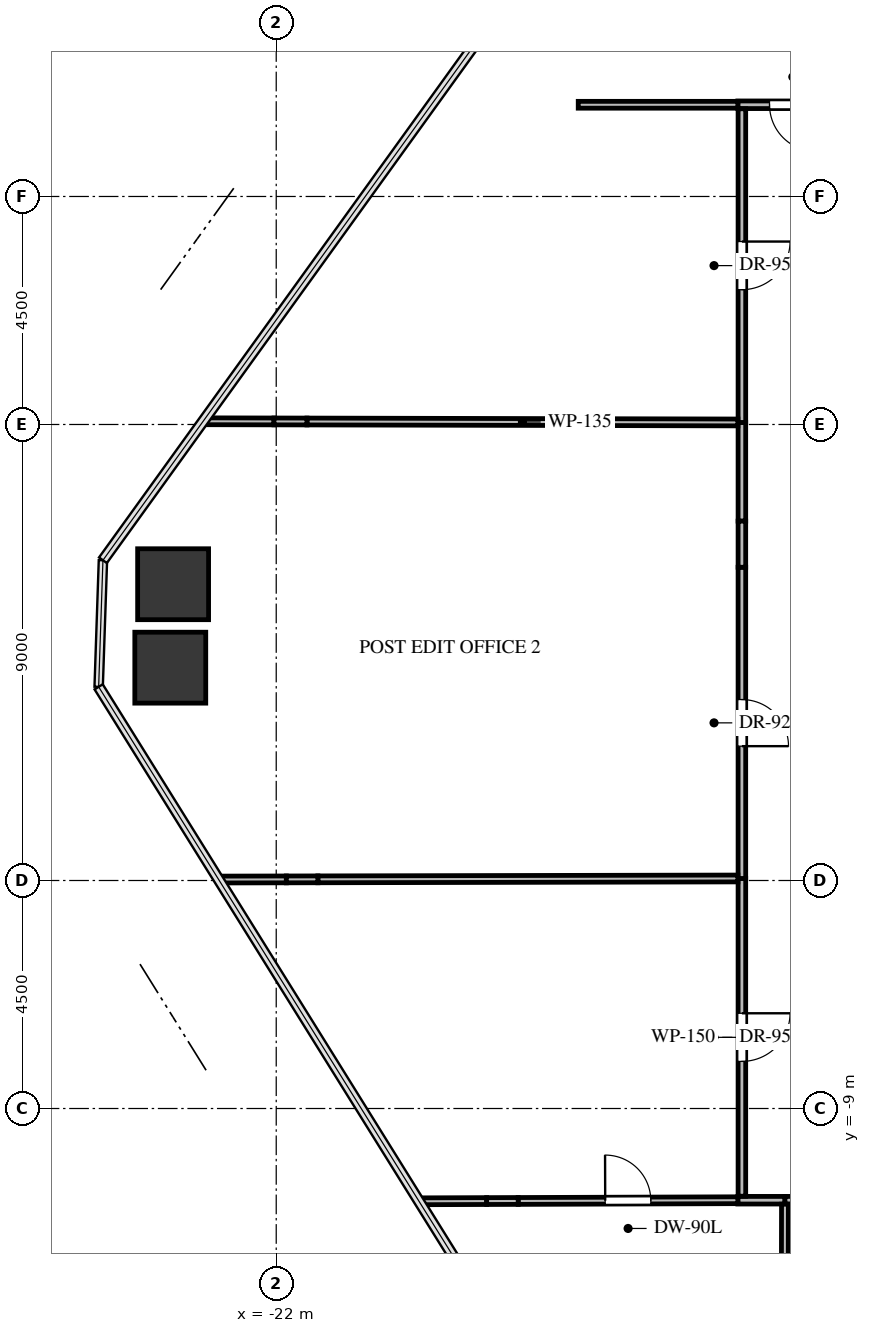
"""IFC4 building model, lengths in metres.
Left out: names, types, materials, properties, quantities, classifications, styles, units other than length and angle.
Written with IfcOpenShell. Run it as: python <this file> out.ifc"""

import sys

from ifc_helpers import new_model, si_unit, direction, frame, frame_2d, origin, origin_2d, place, context, subcontext, project, spatial, rectangle, extrude, source, transform, mapped, element, fill, save


model = new_model("IFC4")
c1 = context("Model", 3, precision=1e-05, world=origin(), true_north=direction((0.0, 1.0)))
c2 = subcontext(c1, "Body", "Model", "MODEL_VIEW")
j1 = project(units=[si_unit("LENGTHUNIT", "METRE"), si_unit("PLANEANGLEUNIT", "RADIAN")], contexts=[c1])
p1 = place(None, origin())
s1 = spatial("IfcSite", under=j1, at=p1, CompositionType="ELEMENT")
p2 = place(p1, origin())
s2 = spatial("IfcBuilding", under=s1, at=p2, CompositionType="ELEMENT")
p3 = place(p2, frame((0.0, 0.0, 78.3)))
s3 = spatial("IfcBuildingStorey", under=s2, at=p3, CompositionType="ELEMENT", Elevation=78.3)
m1 = source(origin(), c2, "Body", "SweptSolid", [
    extrude(rectangle(XDim=1.4, YDim=1.4, at=origin_2d()), origin(), (0.0, 0.0, 1.0), 3.0),
])
for number, where, z_axis, x_axis in (
    (1, (-24.091, -0.3, -0.24), (0.0, 0.0, 1.0), (1.0, 0.0, 0.0)),
    (2, (-24.035, 1.347, -0.24), (0.0, 0.0, 1.0), (1.0, 0.0, 0.0)),
):
    element("IfcColumn", number, at=place(p3, frame(where, z_axis=z_axis, x_axis=x_axis)), inside=s3, PredefinedType="COLUMN", context=c2, shape_type="MappedRepresentation", body=[
        mapped(m1, transform((0.0, 0.0, 0.0), x_axis=(1.0, 0.0, 0.0), y_axis=(0.0, 1.0, 0.0), z_axis=(0.0, 0.0, 1.0), scale=1.0)),
    ])
p4 = place(p3, frame((-10.72, 10.81, 0.0), z_axis=(0.0, 0.0, 1.0), x_axis=(-1.0, 0.0, 0.0)))
e3 = element("IfcWall", 3, at=p4, inside=s3, PredefinedType="PARTITIONING", context=c2, shape_type="SweptSolid", body=[
    extrude(rectangle(XDim=2.17, YDim=0.15, at=frame_2d((1.085, 0.0))), origin(), (0.0, 0.0, 1.0), 2.745),
])
p5 = place(p4, frame((0.625, 0.0, 0.0)))
e4 = element("IfcOpeningElement", 4, at=p5, cuts=e3, PredefinedType="OPENING", context=c2, shape_type="SweptSolid", body=[
    extrude(rectangle(XDim=0.92, YDim=2.1, at=frame_2d((0.46, 1.05))), frame((0.0, 0.085, 0.0), z_axis=(0.0, -1.0, 0.0), x_axis=(1.0, 0.0, 0.0)), (0.0, 0.0, 1.0), 0.17),
])
p6 = place(p3, frame((-12.89, -10.81, 0.0), z_axis=(0.0, 0.0, 1.0), x_axis=(1.0, 0.0, 0.0)))
e5 = element("IfcWall", 5, at=p6, inside=s3, PredefinedType="PARTITIONING", context=c2, shape_type="SweptSolid", body=[
    extrude(rectangle(XDim=0.93, YDim=0.15, at=frame_2d((0.465, 0.0))), origin(), (0.0, 0.0, 1.0), 2.745),
])
p7 = place(p3, frame((-11.96, -10.81, 0.0), z_axis=(0.0, 0.0, 1.0), x_axis=(1.0, 0.0, 0.0)))
e6 = element("IfcWall", 6, at=p7, inside=s3, PredefinedType="PARTITIONING", context=c2, shape_type="SweptSolid", body=[
    extrude(rectangle(XDim=5.838, YDim=0.15, at=frame_2d((2.919, 0.0))), origin(), (0.0, 0.0, 1.0), 1.83),
])
p8 = place(p3, frame((-12.81, -4.46, 0.0), z_axis=(0.0, 0.0, 1.0), x_axis=(0.0, -1.0, 0.0)))
e7 = element("IfcWall", 7, at=p8, inside=s3, PredefinedType="PARTITIONING", context=c2, shape_type="SweptSolid", body=[
    extrude(rectangle(XDim=6.271, YDim=0.15, at=frame_2d((3.135, 0.0))), origin(), (0.0, 0.0, 1.0), 2.745),
])
p9 = place(p8, frame((2.66, 0.0, 0.0)))
e8 = element("IfcOpeningElement", 8, at=p9, cuts=e7, PredefinedType="OPENING", context=c2, shape_type="SweptSolid", body=[
    extrude(rectangle(XDim=0.95, YDim=2.1, at=frame_2d((0.475, 1.05))), frame((0.0, 0.085, 0.0), z_axis=(0.0, -1.0, 0.0), x_axis=(1.0, 0.0, 0.0)), (0.0, 0.0, 1.0), 0.17),
])
p10 = place(p3, frame((-12.81, 4.54, 0.0), z_axis=(0.0, 0.0, 1.0), x_axis=(0.0, -1.0, 0.0)))
e9 = element("IfcWall", 9, at=p10, inside=s3, PredefinedType="PARTITIONING", context=c2, shape_type="SweptSolid", body=[
    extrude(rectangle(XDim=1.948, YDim=0.15, at=frame_2d((0.974, 0.0))), origin(), (0.0, 0.0, 1.0), 2.745),
])
p11 = place(p3, frame((-12.81, 1.682, 0.0), z_axis=(0.0, 0.0, 1.0), x_axis=(0.0, -1.0, 0.0)))
e10 = element("IfcWall", 10, at=p11, inside=s3, PredefinedType="PARTITIONING", context=c2, shape_type="SweptSolid", body=[
    extrude(rectangle(XDim=6.142, YDim=0.15, at=frame_2d((3.071, 0.0))), origin(), (0.0, 0.0, 1.0), 2.745),
])
p12 = place(p11, frame((2.611, 0.0, 0.0)))
e11 = element("IfcOpeningElement", 11, at=p12, cuts=e10, PredefinedType="OPENING", context=c2, shape_type="SweptSolid", body=[
    extrude(rectangle(XDim=0.92, YDim=2.1, at=frame_2d((0.46, 1.05))), frame((0.0, 0.085, 0.0), z_axis=(0.0, -1.0, 0.0), x_axis=(1.0, 0.0, 0.0)), (0.0, 0.0, 1.0), 0.17),
])
p13 = place(p3, frame((-12.81, 2.592, 0.0), z_axis=(0.0, 0.0, 1.0), x_axis=(0.0, -1.0, 0.0)))
e12 = element("IfcWall", 12, at=p13, inside=s3, PredefinedType="PARTITIONING", context=c2, shape_type="SweptSolid", body=[
    extrude(rectangle(XDim=0.91, YDim=0.15, at=frame_2d((0.455, 0.0))), origin(), (0.0, 0.0, 1.0), 1.83),
])
p14 = place(p3, frame((-12.81, 10.731, 0.0), z_axis=(0.0, 0.0, 1.0), x_axis=(0.0, -1.0, 0.0)))
e13 = element("IfcWall", 13, at=p14, inside=s3, PredefinedType="PARTITIONING", context=c2, shape_type="SweptSolid", body=[
    extrude(rectangle(XDim=6.191, YDim=0.15, at=frame_2d((3.095, 0.0))), origin(), (0.0, 0.0, 1.0), 2.745),
])
p15 = place(p14, frame((2.621, 0.0, 0.0)))
e14 = element("IfcOpeningElement", 14, at=p15, cuts=e13, PredefinedType="OPENING", context=c2, shape_type="SweptSolid", body=[
    extrude(rectangle(XDim=0.95, YDim=2.1, at=frame_2d((0.475, 1.05))), frame((0.0, 0.085, 0.0), z_axis=(0.0, -1.0, 0.0), x_axis=(1.0, 0.0, 0.0)), (0.0, 0.0, 1.0), 0.17),
])
p16 = place(p3, frame((-12.89, 10.81, 0.0), z_axis=(0.0, 0.0, 1.0), x_axis=(-1.0, 0.0, 0.0)))
e15 = element("IfcWall", 15, at=p16, inside=s3, PredefinedType="PARTITIONING", context=c2, shape_type="SweptSolid", body=[
    extrude(rectangle(XDim=3.15, YDim=0.135, at=frame_2d((1.575, 0.0))), origin(), (0.0, 0.0, 1.0), 2.745),
])
p17 = place(p3, frame((-11.96, -10.889, 0.0), z_axis=(0.0, 0.0, 1.0), x_axis=(-0.002018838416, -0.999997962144, 0.0)))
e16 = element("IfcWall", 16, at=p17, inside=s3, PredefinedType="PARTITIONING", context=c2, shape_type="SweptSolid", body=[
    extrude(rectangle(XDim=5.805, YDim=0.135, at=frame_2d((2.902, 0.0))), origin(), (0.0, 0.0, 1.0), 1.83),
])
p18 = place(p3, frame((-19.182, -10.831, 0.0), z_axis=(0.0, 0.0, 1.0), x_axis=(0.999994579825, 0.00329246432, 0.0)))
e17 = element("IfcWall", 17, at=p18, inside=s3, PredefinedType="PARTITIONING", context=c2, shape_type="SweptSolid", body=[
    extrude(rectangle(XDim=1.335, YDim=0.135, at=frame_2d((0.667, 0.0))), origin(), (0.0, 0.0, 1.0), 2.745),
])
p19 = place(p3, frame((-17.225, -10.825, 0.0), z_axis=(0.0, 0.0, 1.0), x_axis=(0.999994480721, 0.003322427884, 0.0)))
e18 = element("IfcWall", 18, at=p19, inside=s3, PredefinedType="PARTITIONING", context=c2, shape_type="SweptSolid", body=[
    extrude(rectangle(XDim=4.335, YDim=0.135, at=frame_2d((2.168, 0.0))), origin(), (0.0, 0.0, 1.0), 2.745),
])
p20 = place(p19, frame((1.718, 0.0, 0.0)))
e19 = element("IfcOpeningElement", 19, at=p20, cuts=e18, PredefinedType="OPENING", context=c2, shape_type="SweptSolid", body=[
    extrude(rectangle(XDim=0.9, YDim=2.05, at=frame_2d((0.45, 1.025))), frame((0.0, 0.078, 0.0), z_axis=(0.0, -1.0, 0.0), x_axis=(1.0, 0.0, 0.0)), (0.0, 0.0, 1.0), 0.155),
])
p21 = place(p3, frame((-17.847, -10.827, 0.0), z_axis=(0.0, 0.0, 1.0), x_axis=(0.999993761903, 0.00353216007, 0.0)))
e20 = element("IfcWall", 20, at=p21, inside=s3, PredefinedType="PARTITIONING", context=c2, shape_type="SweptSolid", body=[
    extrude(rectangle(XDim=0.622, YDim=0.135, at=frame_2d((0.311, 0.0))), origin(), (0.0, 0.0, 1.0), 2.08),
])
p22 = place(p3, frame((-23.136, -4.481, 0.0), z_axis=(0.0, 0.0, 1.0), x_axis=(0.999997979486, 0.002010229856, 0.0)))
e21 = element("IfcWall", 21, at=p22, inside=s3, PredefinedType="PARTITIONING", context=c2, shape_type="SweptSolid", body=[
    extrude(rectangle(XDim=1.336, YDim=0.135, at=frame_2d((0.668, 0.0))), origin(), (0.0, 0.0, 1.0), 2.745),
])
p23 = place(p3, frame((-21.178, -4.477, 0.0), z_axis=(0.0, 0.0, 1.0), x_axis=(0.999997934924, 0.00203227667, 0.0)))
e22 = element("IfcWall", 22, at=p23, inside=s3, PredefinedType="PARTITIONING", context=c2, shape_type="SweptSolid", body=[
    extrude(rectangle(XDim=8.289, YDim=0.135, at=frame_2d((4.145, 0.0))), origin(), (0.0, 0.0, 1.0), 2.745),
])
p24 = place(p3, frame((-21.8, -4.479, 0.0), z_axis=(0.0, 0.0, 1.0), x_axis=(0.999997229673, 0.00235385774, 0.0)))
e23 = element("IfcWall", 23, at=p24, inside=s3, PredefinedType="PARTITIONING", context=c2, shape_type="SweptSolid", body=[
    extrude(rectangle(XDim=0.622, YDim=0.135, at=frame_2d((0.311, 0.0))), origin(), (0.0, 0.0, 1.0), 2.08),
])
p25 = place(p3, frame((-23.442, 4.563, 0.0), z_axis=(0.0, 0.0, 1.0), x_axis=(0.999997421875, -0.002270736504, 0.0)))
e24 = element("IfcWall", 24, at=p25, inside=s3, PredefinedType="PARTITIONING", context=c2, shape_type="SweptSolid", body=[
    extrude(rectangle(XDim=1.398, YDim=0.135, at=frame_2d((0.699, 0.0))), origin(), (0.0, 0.0, 1.0), 2.745),
])
p26 = place(p3, frame((-21.393, 4.559, 0.0), z_axis=(0.0, 0.0, 1.0), x_axis=(0.999997619934, -0.002181771233, 0.0)))
e25 = element("IfcWall", 25, at=p26, inside=s3, PredefinedType="PARTITIONING", context=c2, shape_type="SweptSolid", body=[
    extrude(rectangle(XDim=8.504, YDim=0.135, at=frame_2d((4.252, 0.0))), origin(), (0.0, 0.0, 1.0), 2.745),
])
p27 = place(p3, frame((-22.045, 4.56, 0.0), z_axis=(0.0, 0.0, 1.0), x_axis=(0.999997471289, -0.002248869875, 0.0)))
e26 = element("IfcWall", 26, at=p27, inside=s3, PredefinedType="PARTITIONING", context=c2, shape_type="SweptSolid", body=[
    extrude(rectangle(XDim=0.651, YDim=0.135, at=frame_2d((0.326, 0.0))), origin(), (0.0, 0.0, 1.0), 2.08),
])
m2 = source(origin(), c2, "Body", "SweptSolid", [
    extrude(rectangle(XDim=0.92, YDim=2.1, at=frame_2d((0.46, 1.05))), frame((0.0, 0.025, 0.0), z_axis=(0.0, -1.0, 0.0), x_axis=(1.0, 0.0, 0.0)), (0.0, 0.0, 1.0), 0.05),
])
p28 = place(p5, origin())
e27 = element("IfcDoor", 27, at=p28, inside=s3, OperationType="SINGLE_SWING_LEFT", PredefinedType="DOOR", context=c2, shape_type="MappedRepresentation", body=[
    mapped(m2, transform((0.0, 0.0, 0.0), x_axis=(1.0, 0.0, 0.0), y_axis=(0.0, 1.0, 0.0), z_axis=(0.0, 0.0, 1.0), scale=1.0)),
])
fill(e4, e27)
m3 = source(origin(), c2, "Body", "SweptSolid", [
    extrude(rectangle(XDim=0.95, YDim=2.1, at=frame_2d((0.475, 1.05))), frame((0.0, 0.025, 0.0), z_axis=(0.0, -1.0, 0.0), x_axis=(1.0, 0.0, 0.0)), (0.0, 0.0, 1.0), 0.05),
])
p29 = place(p9, origin())
e28 = element("IfcDoor", 28, at=p29, inside=s3, OperationType="SINGLE_SWING_LEFT", PredefinedType="DOOR", context=c2, shape_type="MappedRepresentation", body=[
    mapped(m3, transform((0.0, 0.0, 0.0), x_axis=(1.0, 0.0, 0.0), y_axis=(0.0, 1.0, 0.0), z_axis=(0.0, 0.0, 1.0), scale=1.0)),
])
fill(e8, e28)
m4 = source(origin(), c2, "Body", "SweptSolid", [
    extrude(rectangle(XDim=0.92, YDim=2.1, at=frame_2d((0.46, 1.05))), frame((0.0, 0.025, 0.0), z_axis=(0.0, -1.0, 0.0), x_axis=(1.0, 0.0, 0.0)), (0.0, 0.0, 1.0), 0.05),
])
p30 = place(p12, origin())
e29 = element("IfcDoor", 29, at=p30, inside=s3, OperationType="SINGLE_SWING_RIGHT", PredefinedType="DOOR", context=c2, shape_type="MappedRepresentation", body=[
    mapped(m4, transform((0.0, 0.0, 0.0), x_axis=(1.0, 0.0, 0.0), y_axis=(0.0, 1.0, 0.0), z_axis=(0.0, 0.0, 1.0), scale=1.0)),
])
fill(e11, e29)
p31 = place(p15, origin())
e30 = element("IfcDoor", 30, at=p31, inside=s3, OperationType="SINGLE_SWING_LEFT", PredefinedType="DOOR", context=c2, shape_type="MappedRepresentation", body=[
    mapped(m3, transform((0.0, 0.0, 0.0), x_axis=(1.0, 0.0, 0.0), y_axis=(0.0, 1.0, 0.0), z_axis=(0.0, 0.0, 1.0), scale=1.0)),
])
fill(e14, e30)
m5 = source(origin(), c2, "Body", "SweptSolid", [
    extrude(rectangle(XDim=0.9, YDim=2.05, at=frame_2d((0.45, 1.025))), frame((0.0, 0.025, 0.0), z_axis=(0.0, -1.0, 0.0), x_axis=(1.0, 0.0, 0.0)), (0.0, 0.0, 1.0), 0.05),
])
p32 = place(p20, origin())
e31 = element("IfcDoor", 31, at=p32, inside=s3, OperationType="SINGLE_SWING_LEFT", PredefinedType="DOOR", context=c2, shape_type="MappedRepresentation", body=[
    mapped(m5, transform((0.0, 0.0, 0.0), x_axis=(1.0, 0.0, 0.0), y_axis=(0.0, 1.0, 0.0), z_axis=(0.0, 0.0, 1.0), scale=1.0)),
])
fill(e19, e31)
save(model, sys.argv[1])
